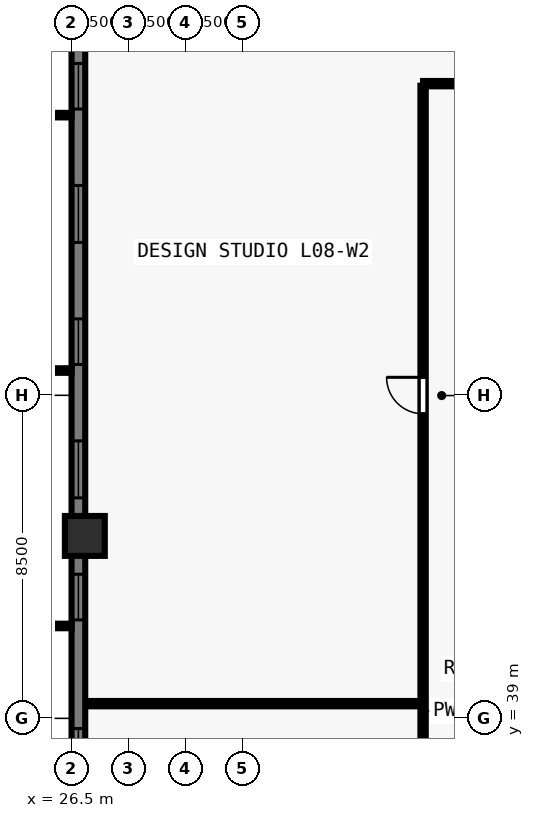
"""IFC4 building model, lengths in metres.
Left out: names, types, materials, properties, quantities, classifications, styles, units other than length and angle.
Written with IfcOpenShell. Run it as: python <this file> out.ifc"""

import sys

from ifc_helpers import new_model, si_unit, direction, frame, frame_2d, origin, origin_2d, place, context, subcontext, project, spatial, rectangle, extrude, element, fill, save


model = new_model("IFC4")
c1 = context("Model", 3, precision=1e-05, world=origin(), true_north=direction((0.0, 1.0)))
c2 = subcontext(c1, "Body", "Model", "MODEL_VIEW")
j1 = project(units=[si_unit("LENGTHUNIT", "METRE"), si_unit("PLANEANGLEUNIT", "RADIAN")], contexts=[c1])
p1 = place(None, origin())
s1 = spatial("IfcSite", under=j1, at=p1, CompositionType="ELEMENT")
p2 = place(p1, origin())
s2 = spatial("IfcBuilding", under=s1, at=p2, CompositionType="ELEMENT")
p3 = place(p2, frame((0.0, 0.0, 34.0)))
s3 = spatial("IfcBuildingStorey", under=s2, at=p3, CompositionType="ELEMENT", Elevation=34.0)
p4 = place(p3, frame((26.85, 43.8, 0.0), z_axis=(0.0, 0.0, 1.0), x_axis=(0.0, 1.0, 0.0)))
e1 = element("IfcColumn", 1, at=p4, inside=s3, PredefinedType="COLUMN", context=c2, shape_type="SweptSolid", body=[
    extrude(rectangle(XDim=1.05, YDim=1.05, at=origin_2d()), origin(), (0.0, 0.0, 1.0), 3.5),
])
p5 = place(p3, frame((26.68, 16.5, 0.0), z_axis=(0.0, 0.0, 1.0), x_axis=(0.0, 1.0, 0.0)))
e2 = element("IfcWall", 2, at=p5, inside=s3, PredefinedType="SOLIDWALL", context=c2, shape_type="SweptSolid", body=[
    extrude(rectangle(XDim=44.662, YDim=0.36, at=frame_2d((22.331, 0.0))), origin(), (0.0, 0.0, 1.0), 3.28),
])
p6 = place(p5, frame((4.93, 0.0, 0.8)))
e3 = element("IfcOpeningElement", 3, at=p6, cuts=e2, PredefinedType="OPENING", context=c2, shape_type="SweptSolid", body=[
    extrude(rectangle(XDim=1.2, YDim=1.544, at=frame_2d((0.6, 0.772))), frame((0.0, 0.19, 0.0), z_axis=(0.0, -1.0, 0.0), x_axis=(1.0, 0.0, 0.0)), (0.0, 0.0, 1.0), 0.38),
])
p7 = place(p5, frame((8.14, 0.0, 0.8)))
e4 = element("IfcOpeningElement", 4, at=p7, cuts=e2, PredefinedType="OPENING", context=c2, shape_type="SweptSolid", body=[
    extrude(rectangle(XDim=1.5, YDim=1.544, at=frame_2d((0.75, 0.772))), frame((0.0, 0.19, 0.0), z_axis=(0.0, -1.0, 0.0), x_axis=(1.0, 0.0, 0.0)), (0.0, 0.0, 1.0), 0.38),
])
p8 = place(p5, frame((11.65, 0.0, 0.8)))
e5 = element("IfcOpeningElement", 5, at=p8, cuts=e2, PredefinedType="OPENING", context=c2, shape_type="SweptSolid", body=[
    extrude(rectangle(XDim=1.2, YDim=1.544, at=frame_2d((0.6, 0.772))), frame((0.0, 0.19, 0.0), z_axis=(0.0, -1.0, 0.0), x_axis=(1.0, 0.0, 0.0)), (0.0, 0.0, 1.0), 0.38),
])
p9 = place(p5, frame((14.861, 0.0, 0.8)))
e6 = element("IfcOpeningElement", 6, at=p9, cuts=e2, PredefinedType="OPENING", context=c2, shape_type="SweptSolid", body=[
    extrude(rectangle(XDim=1.5, YDim=1.544, at=frame_2d((0.75, 0.772))), frame((0.0, 0.19, 0.0), z_axis=(0.0, -1.0, 0.0), x_axis=(1.0, 0.0, 0.0)), (0.0, 0.0, 1.0), 0.38),
])
p10 = place(p5, frame((18.821, 0.0, 0.8)))
e7 = element("IfcOpeningElement", 7, at=p10, cuts=e2, PredefinedType="OPENING", context=c2, shape_type="SweptSolid", body=[
    extrude(rectangle(XDim=1.2, YDim=1.544, at=frame_2d((0.6, 0.772))), frame((0.0, 0.19, 0.0), z_axis=(0.0, -1.0, 0.0), x_axis=(1.0, 0.0, 0.0)), (0.0, 0.0, 1.0), 0.38),
])
p11 = place(p5, frame((20.731, 0.0, 0.8)))
e8 = element("IfcOpeningElement", 8, at=p11, cuts=e2, PredefinedType="OPENING", context=c2, shape_type="SweptSolid", body=[
    extrude(rectangle(XDim=1.5, YDim=1.544, at=frame_2d((0.75, 0.772))), frame((0.0, 0.19, 0.0), z_axis=(0.0, -1.0, 0.0), x_axis=(1.0, 0.0, 0.0)), (0.0, 0.0, 1.0), 0.38),
])
p12 = place(p5, frame((25.091, 0.0, 0.8)))
e9 = element("IfcOpeningElement", 9, at=p12, cuts=e2, PredefinedType="OPENING", context=c2, shape_type="SweptSolid", body=[
    extrude(rectangle(XDim=1.2, YDim=1.544, at=frame_2d((0.6, 0.772))), frame((0.0, 0.19, 0.0), z_axis=(0.0, -1.0, 0.0), x_axis=(1.0, 0.0, 0.0)), (0.0, 0.0, 1.0), 0.38),
])
p13 = place(p5, frame((28.302, 0.0, 0.8)))
e10 = element("IfcOpeningElement", 10, at=p13, cuts=e2, PredefinedType="OPENING", context=c2, shape_type="SweptSolid", body=[
    extrude(rectangle(XDim=1.5, YDim=1.544, at=frame_2d((0.75, 0.772))), frame((0.0, 0.19, 0.0), z_axis=(0.0, -1.0, 0.0), x_axis=(1.0, 0.0, 0.0)), (0.0, 0.0, 1.0), 0.38),
])
p14 = place(p5, frame((31.812, 0.0, 0.8)))
e11 = element("IfcOpeningElement", 11, at=p14, cuts=e2, PredefinedType="OPENING", context=c2, shape_type="SweptSolid", body=[
    extrude(rectangle(XDim=1.2, YDim=1.544, at=frame_2d((0.6, 0.772))), frame((0.0, 0.19, 0.0), z_axis=(0.0, -1.0, 0.0), x_axis=(1.0, 0.0, 0.0)), (0.0, 0.0, 1.0), 0.38),
])
p15 = place(p5, frame((35.022, 0.0, 0.8)))
e12 = element("IfcOpeningElement", 12, at=p15, cuts=e2, PredefinedType="OPENING", context=c2, shape_type="SweptSolid", body=[
    extrude(rectangle(XDim=1.5, YDim=1.544, at=frame_2d((0.75, 0.772))), frame((0.0, 0.19, 0.0), z_axis=(0.0, -1.0, 0.0), x_axis=(1.0, 0.0, 0.0)), (0.0, 0.0, 1.0), 0.38),
])
p16 = place(p5, frame((38.532, 0.0, 0.8)))
e13 = element("IfcOpeningElement", 13, at=p16, cuts=e2, PredefinedType="OPENING", context=c2, shape_type="SweptSolid", body=[
    extrude(rectangle(XDim=1.2, YDim=1.544, at=frame_2d((0.6, 0.772))), frame((0.0, 0.19, 0.0), z_axis=(0.0, -1.0, 0.0), x_axis=(1.0, 0.0, 0.0)), (0.0, 0.0, 1.0), 0.38),
])
p17 = place(p3, frame((35.75, 55.7, 0.0), z_axis=(0.0, 0.0, 1.0), x_axis=(1.0, 0.0, 0.0)))
e14 = element("IfcWall", 14, at=p17, inside=s3, PredefinedType="PARTITIONING", context=c2, shape_type="SweptSolid", body=[
    extrude(rectangle(XDim=32.5, YDim=0.14, at=frame_2d((16.25, 0.0))), origin(), (0.0, 0.0, 1.0), 3.28),
])
p18 = place(p17, frame((3.154, 0.0, 0.0)))
e15 = element("IfcOpeningElement", 15, at=p18, cuts=e14, PredefinedType="OPENING", context=c2, shape_type="SweptSolid", body=[
    extrude(rectangle(XDim=0.96, YDim=2.12, at=frame_2d((0.48, 1.06))), frame((0.0, 0.08, 0.0), z_axis=(0.0, -1.0, 0.0), x_axis=(1.0, 0.0, 0.0)), (0.0, 0.0, 1.0), 0.16),
])
p19 = place(p17, frame((27.834, 0.0, 0.0)))
e16 = element("IfcOpeningElement", 16, at=p19, cuts=e14, PredefinedType="OPENING", context=c2, shape_type="SweptSolid", body=[
    extrude(rectangle(XDim=0.96, YDim=2.12, at=frame_2d((0.48, 1.06))), frame((0.0, 0.08, 0.0), z_axis=(0.0, -1.0, 0.0), x_axis=(1.0, 0.0, 0.0)), (0.0, 0.0, 1.0), 0.16),
])
p20 = place(p3, frame((35.75, 22.355, 0.0), z_axis=(0.0, 0.0, 1.0), x_axis=(0.0, 1.0, 0.0)))
e17 = element("IfcWall", 17, at=p20, inside=s3, PredefinedType="PARTITIONING", context=c2, shape_type="SweptSolid", body=[
    extrude(rectangle(XDim=33.29, YDim=0.14, at=frame_2d((16.645, 0.0))), origin(), (0.0, 0.0, 1.0), 3.28),
])
p21 = place(p20, frame((8.058, 0.0, 0.0)))
e18 = element("IfcOpeningElement", 18, at=p21, cuts=e17, PredefinedType="OPENING", context=c2, shape_type="SweptSolid", body=[
    extrude(rectangle(XDim=0.96, YDim=2.12, at=frame_2d((0.48, 1.06))), frame((0.0, 0.08, 0.0), z_axis=(0.0, -1.0, 0.0), x_axis=(1.0, 0.0, 0.0)), (0.0, 0.0, 1.0), 0.16),
])
p22 = place(p20, frame((24.658, 0.0, 0.0)))
e19 = element("IfcOpeningElement", 19, at=p22, cuts=e17, PredefinedType="OPENING", context=c2, shape_type="SweptSolid", body=[
    extrude(rectangle(XDim=0.96, YDim=2.12, at=frame_2d((0.48, 1.06))), frame((0.0, 0.08, 0.0), z_axis=(0.0, -1.0, 0.0), x_axis=(1.0, 0.0, 0.0)), (0.0, 0.0, 1.0), 0.16),
])
p23 = place(p3, frame((26.92, 39.387, 0.0), z_axis=(0.0, 0.0, 1.0), x_axis=(1.0, 0.0, 0.0)))
e20 = element("IfcWall", 20, at=p23, inside=s3, PredefinedType="PARTITIONING", context=c2, shape_type="SweptSolid", body=[
    extrude(rectangle(XDim=8.73, YDim=0.14, at=frame_2d((4.365, 0.0))), origin(), (0.0, 0.0, 1.0), 2.849),
])
p24 = place(p11, origin())
e21 = element("IfcWindow", 21, at=p24, inside=s3, PartitioningType="SINGLE_PANEL", PredefinedType="WINDOW", context=c2, shape_type="SweptSolid", body=[
    extrude(rectangle(XDim=1.5, YDim=1.544, at=frame_2d((0.75, 0.772))), frame((0.0, -0.05, 0.0), z_axis=(0.0, -1.0, 0.0), x_axis=(1.0, 0.0, 0.0)), (0.0, 0.0, 1.0), 0.06),
])
fill(e8, e21)
p25 = place(p12, origin())
e22 = element("IfcWindow", 22, at=p25, inside=s3, PartitioningType="SINGLE_PANEL", PredefinedType="WINDOW", context=c2, shape_type="SweptSolid", body=[
    extrude(rectangle(XDim=1.2, YDim=1.544, at=frame_2d((0.6, 0.772))), frame((0.0, -0.05, 0.0), z_axis=(0.0, -1.0, 0.0), x_axis=(1.0, 0.0, 0.0)), (0.0, 0.0, 1.0), 0.06),
])
fill(e9, e22)
p26 = place(p13, origin())
e23 = element("IfcWindow", 23, at=p26, inside=s3, PartitioningType="SINGLE_PANEL", PredefinedType="WINDOW", context=c2, shape_type="SweptSolid", body=[
    extrude(rectangle(XDim=1.5, YDim=1.544, at=frame_2d((0.75, 0.772))), frame((0.0, -0.05, 0.0), z_axis=(0.0, -1.0, 0.0), x_axis=(1.0, 0.0, 0.0)), (0.0, 0.0, 1.0), 0.06),
])
fill(e10, e23)
p27 = place(p14, origin())
e24 = element("IfcWindow", 24, at=p27, inside=s3, PartitioningType="SINGLE_PANEL", PredefinedType="WINDOW", context=c2, shape_type="SweptSolid", body=[
    extrude(rectangle(XDim=1.2, YDim=1.544, at=frame_2d((0.6, 0.772))), frame((0.0, -0.05, 0.0), z_axis=(0.0, -1.0, 0.0), x_axis=(1.0, 0.0, 0.0)), (0.0, 0.0, 1.0), 0.06),
])
fill(e11, e24)
p28 = place(p15, origin())
e25 = element("IfcWindow", 25, at=p28, inside=s3, PartitioningType="SINGLE_PANEL", PredefinedType="WINDOW", context=c2, shape_type="SweptSolid", body=[
    extrude(rectangle(XDim=1.5, YDim=1.544, at=frame_2d((0.75, 0.772))), frame((0.0, -0.05, 0.0), z_axis=(0.0, -1.0, 0.0), x_axis=(1.0, 0.0, 0.0)), (0.0, 0.0, 1.0), 0.06),
])
fill(e12, e25)
p29 = place(p16, origin())
e26 = element("IfcWindow", 26, at=p29, inside=s3, PartitioningType="SINGLE_PANEL", PredefinedType="WINDOW", context=c2, shape_type="SweptSolid", body=[
    extrude(rectangle(XDim=1.2, YDim=1.544, at=frame_2d((0.6, 0.772))), frame((0.0, -0.05, 0.0), z_axis=(0.0, -1.0, 0.0), x_axis=(1.0, 0.0, 0.0)), (0.0, 0.0, 1.0), 0.06),
])
fill(e13, e26)
p30 = place(p22, origin())
e27 = element("IfcDoor", 27, at=p30, inside=s3, OperationType="SINGLE_SWING_RIGHT", PredefinedType="DOOR", context=c2, shape_type="SweptSolid", body=[
    extrude(rectangle(XDim=0.96, YDim=2.12, at=frame_2d((0.48, 1.06))), frame((0.0, 0.025, 0.0), z_axis=(0.0, -1.0, 0.0), x_axis=(1.0, 0.0, 0.0)), (0.0, 0.0, 1.0), 0.05),
])
fill(e19, e27)
save(model, sys.argv[1])
